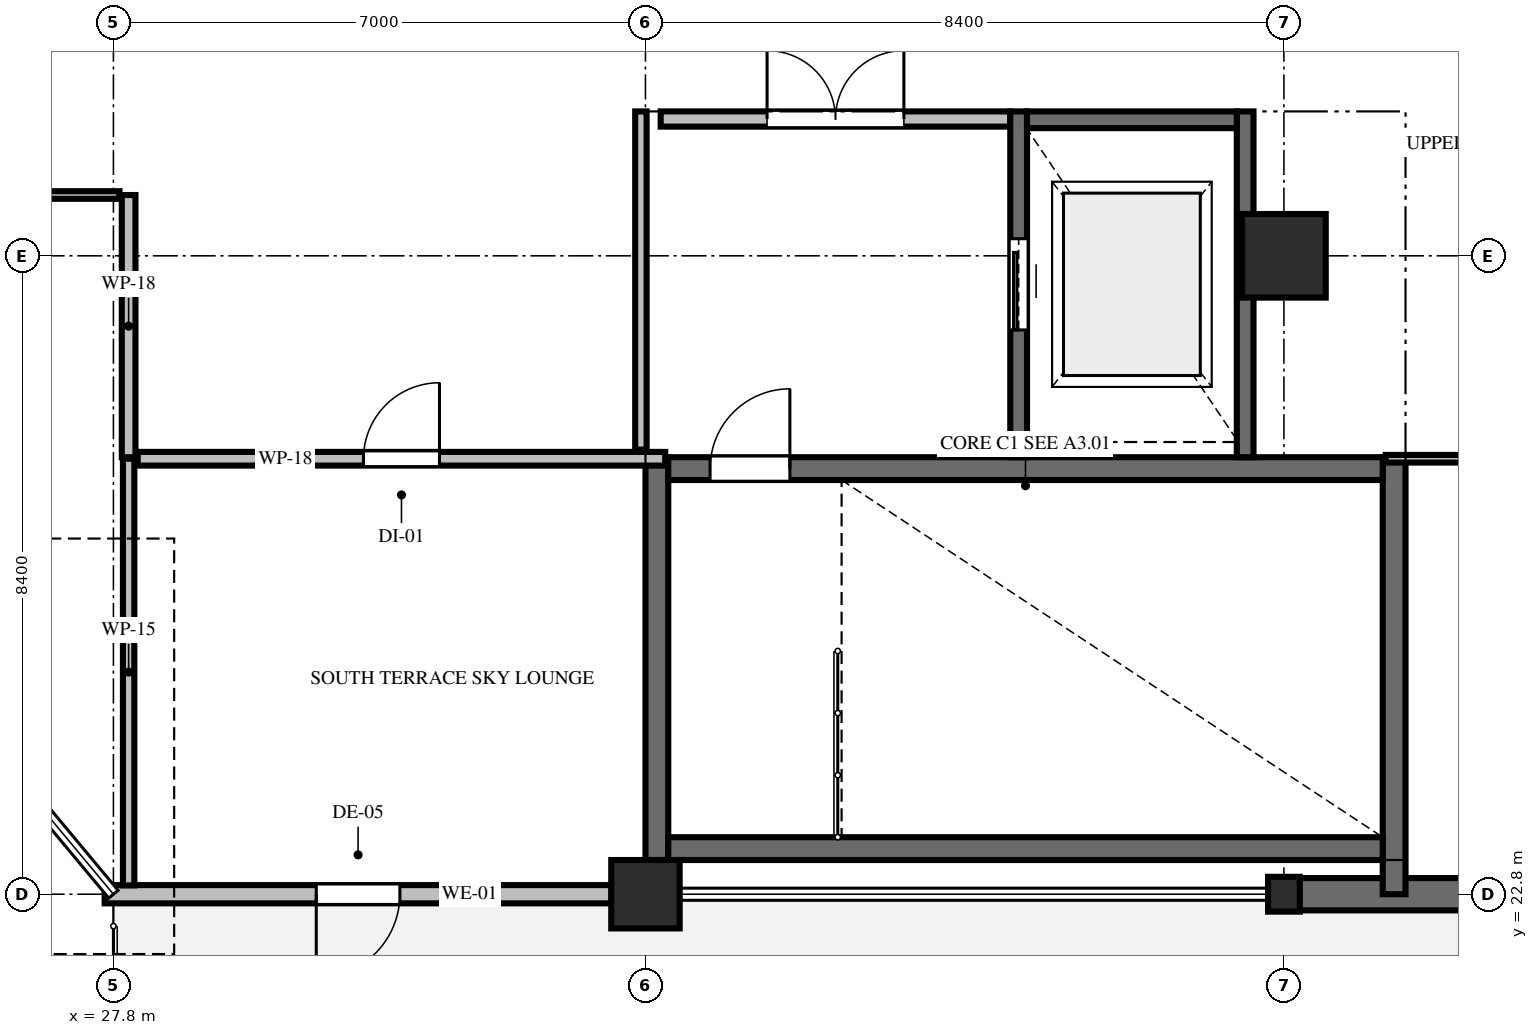
"""IFC4 building model, lengths in metres.
Left out: names, types, materials, properties, quantities, classifications, styles, units other than length and angle.
Written with IfcOpenShell. Run it as: python <this file> out.ifc"""

import sys

from ifc_helpers import new_model, si_unit, direction, frame, frame_2d, origin, origin_2d, place, context, subcontext, project, spatial, rectangle, hollow_rectangle, i_section, extrude, element, fill, save


model = new_model("IFC4")
c1 = context("Model", 3, precision=1e-05, world=origin(), true_north=direction((0.0, 1.0)))
c2 = subcontext(c1, "Body", "Model", "MODEL_VIEW")
j1 = project(units=[si_unit("LENGTHUNIT", "METRE"), si_unit("PLANEANGLEUNIT", "RADIAN")], contexts=[c1])
p1 = place(None, origin())
s1 = spatial("IfcSite", under=j1, at=p1, CompositionType="ELEMENT")
p2 = place(p1, origin())
s2 = spatial("IfcBuilding", under=s1, at=p2, CompositionType="ELEMENT")
p3 = place(p2, frame((0.0, 0.0, 16.8)))
s3 = spatial("IfcBuildingStorey", under=s2, at=p3, CompositionType="ELEMENT", Elevation=16.8)
p4 = place(p3, frame((34.8, 22.8, 0.0), z_axis=(0.0, 0.0, 1.0), x_axis=(1.0, 0.0, 0.0)))
e1 = element("IfcColumn", 1, at=p4, inside=s3, PredefinedType="COLUMN", context=c2, shape_type="SweptSolid", body=[
    extrude(hollow_rectangle(XDim=0.9, YDim=0.9, WallThickness=0.036, InnerFilletRadius=0.036, OuterFilletRadius=0.072, at=origin_2d()), origin(), (0.0, 0.0, 1.0), 5.4),
])
p5 = place(p3, frame((43.2, 22.8, 0.0), z_axis=(0.0, 0.0, 1.0), x_axis=(1.0, 0.0, 0.0)))
e2 = element("IfcColumn", 2, at=p5, inside=s3, PredefinedType="COLUMN", context=c2, shape_type="SweptSolid", body=[
    extrude(i_section(OverallWidth=0.417, OverallDepth=0.458, WebThickness=0.03, FlangeThickness=0.04, FilletRadius=0.022, at=origin_2d()), origin(), (0.0, 0.0, 1.0), 5.4),
])
p6 = place(p3, frame((43.2, 31.2, 0.0), z_axis=(0.0, 0.0, 1.0), x_axis=(1.0, 0.0, 0.0)))
e3 = element("IfcColumn", 3, at=p6, inside=s3, PredefinedType="COLUMN", context=c2, shape_type="SweptSolid", body=[
    extrude(rectangle(XDim=1.1, YDim=1.1, at=origin_2d()), origin(), (0.0, 0.0, 1.0), 5.4),
])
p7 = place(p3, frame((51.204, 22.8, 0.0), z_axis=(0.0, 0.0, 1.0), x_axis=(-1.0, 0.0, 0.0)))
e4 = element("IfcWall", 4, at=p7, inside=s3, PredefinedType="SOLIDWALL", context=c2, shape_type="SweptSolid", body=[
    extrude(rectangle(XDim=7.8, YDim=0.425, at=frame_2d((3.9, 0.0))), origin(), (0.0, 0.0, 1.0), 4.408),
])
p8 = place(p7, frame((2.4, 0.0, 0.9)))
e5 = element("IfcOpeningElement", 5, at=p8, cuts=e4, PredefinedType="OPENING", context=c2, shape_type="SweptSolid", body=[
    extrude(rectangle(XDim=3.0, YDim=1.4, at=frame_2d((1.5, 0.7))), frame((0.0, 0.222, 0.0), z_axis=(0.0, -1.0, 0.0), x_axis=(1.0, 0.0, 0.0)), (0.0, 0.0, 1.0), 0.445),
])
p9 = place(p3, frame((34.354, 22.8, 0.0), z_axis=(0.0, 0.0, 1.0), x_axis=(-1.0, 0.0, 0.0)))
e6 = element("IfcWall", 6, at=p9, inside=s3, PredefinedType="SOLIDWALL", context=c2, shape_type="SweptSolid", body=[
    extrude(rectangle(XDim=6.669, YDim=0.24, at=frame_2d((3.334, 0.0))), origin(), (0.0, 0.0, 1.0), 5.1),
])
p10 = place(p9, frame((2.785, 0.0, 0.0)))
e7 = element("IfcOpeningElement", 7, at=p10, cuts=e6, PredefinedType="OPENING", context=c2, shape_type="SweptSolid", body=[
    extrude(rectangle(XDim=1.1, YDim=2.2, at=frame_2d((0.55, 1.1))), frame((0.0, 0.13, 0.0), z_axis=(0.0, -1.0, 0.0), x_axis=(1.0, 0.0, 0.0)), (0.0, 0.0, 1.0), 0.26),
])
p11 = place(p3, frame((34.95, 23.25, 0.0), z_axis=(0.0, 0.0, 1.0), x_axis=(0.0, 1.0, 0.0)))
e8 = element("IfcWall", 8, at=p11, inside=s3, PredefinedType="SHEAR", context=c2, shape_type="SweptSolid", body=[
    extrude(rectangle(XDim=5.3, YDim=0.3, at=frame_2d((2.65, 0.0))), origin(), (0.0, 0.0, 1.0), 5.12),
])
p12 = place(p3, frame((44.65, 28.55, 0.0), z_axis=(0.0, 0.0, 1.0), x_axis=(0.0, -1.0, 0.0)))
e9 = element("IfcWall", 9, at=p12, inside=s3, PredefinedType="SHEAR", context=c2, shape_type="SweptSolid", body=[
    extrude(rectangle(XDim=5.75, YDim=0.3, at=frame_2d((2.875, 0.0))), origin(), (0.0, 0.0, 1.0), 5.12),
])
p13 = place(p3, frame((44.5, 23.4, 0.0), z_axis=(0.0, 0.0, 1.0), x_axis=(-1.0, 0.0, 0.0)))
e10 = element("IfcWall", 10, at=p13, inside=s3, PredefinedType="SHEAR", context=c2, shape_type="SweptSolid", body=[
    extrude(rectangle(XDim=9.4, YDim=0.3, at=frame_2d((4.7, 0.0))), origin(), (0.0, 0.0, 1.0), 5.12),
])
p14 = place(p3, frame((35.1, 28.4, 0.0), z_axis=(0.0, 0.0, 1.0), x_axis=(1.0, 0.0, 0.0)))
e11 = element("IfcWall", 11, at=p14, inside=s3, PredefinedType="SHEAR", context=c2, shape_type="SweptSolid", body=[
    extrude(rectangle(XDim=9.4, YDim=0.3, at=frame_2d((4.7, 0.0))), origin(), (0.0, 0.0, 1.0), 5.12),
])
p15 = place(p14, frame((0.55, 0.0, 0.0)))
e12 = element("IfcOpeningElement", 12, at=p15, cuts=e11, PredefinedType="OPENING", context=c2, shape_type="SweptSolid", body=[
    extrude(rectangle(XDim=1.05, YDim=2.2, at=frame_2d((0.525, 1.1))), frame((0.0, 0.16, 0.0), z_axis=(0.0, -1.0, 0.0), x_axis=(1.0, 0.0, 0.0)), (0.0, 0.0, 1.0), 0.32),
])
p16 = place(p3, frame((35.0, 33.0, 0.0), z_axis=(0.0, 0.0, 1.0), x_axis=(1.0, 0.0, 0.0)))
e13 = element("IfcWall", 13, at=p16, inside=s3, PredefinedType="SOLIDWALL", context=c2, shape_type="SweptSolid", body=[
    extrude(rectangle(XDim=4.6, YDim=0.2, at=frame_2d((2.3, 0.0))), origin(), (0.0, 0.0, 1.0), 4.41),
])
p17 = place(p16, frame((1.4, 0.0, 0.0)))
e14 = element("IfcOpeningElement", 14, at=p17, cuts=e13, PredefinedType="OPENING", context=c2, shape_type="SweptSolid", body=[
    extrude(rectangle(XDim=1.8, YDim=2.2, at=frame_2d((0.9, 1.1))), frame((0.0, 0.11, 0.0), z_axis=(0.0, -1.0, 0.0), x_axis=(1.0, 0.0, 0.0)), (0.0, 0.0, 1.0), 0.22),
])
p18 = place(p3, frame((39.71, 28.55, 0.0), z_axis=(0.0, 0.0, 1.0), x_axis=(0.0, 1.0, 0.0)))
e15 = element("IfcWall", 15, at=p18, inside=s3, PredefinedType="SOLIDWALL", context=c2, shape_type="SweptSolid", body=[
    extrude(rectangle(XDim=4.55, YDim=0.22, at=frame_2d((2.275, 0.0))), origin(), (0.0, 0.0, 1.0), 5.12),
])
p19 = place(p18, frame((1.675, 0.0, 0.0)))
e16 = element("IfcOpeningElement", 16, at=p19, cuts=e15, PredefinedType="OPENING", context=c2, shape_type="SweptSolid", body=[
    extrude(rectangle(XDim=1.2, YDim=2.2, at=frame_2d((0.6, 1.1))), frame((0.0, 0.12, 0.0), z_axis=(0.0, -1.0, 0.0), x_axis=(1.0, 0.0, 0.0)), (0.0, 0.0, 1.0), 0.24),
])
p20 = place(p3, frame((42.69, 28.55, 0.0), z_axis=(0.0, 0.0, 1.0), x_axis=(0.0, 1.0, 0.0)))
e17 = element("IfcWall", 17, at=p20, inside=s3, PredefinedType="SOLIDWALL", context=c2, shape_type="SweptSolid", body=[
    extrude(rectangle(XDim=4.55, YDim=0.22, at=frame_2d((2.275, 0.0))), origin(), (0.0, 0.0, 1.0), 5.12),
])
p21 = place(p3, frame((39.82, 32.99, 0.0), z_axis=(0.0, 0.0, 1.0), x_axis=(1.0, 0.0, 0.0)))
e18 = element("IfcWall", 18, at=p21, inside=s3, PredefinedType="SOLIDWALL", context=c2, shape_type="SweptSolid", body=[
    extrude(rectangle(XDim=2.76, YDim=0.22, at=frame_2d((1.38, 0.0))), origin(), (0.0, 0.0, 1.0), 5.12),
])
p22 = place(p3, frame((28.0, 22.916, 0.0), z_axis=(0.0, 0.0, 1.0), x_axis=(0.0, 1.0, 0.0)))
e19 = element("IfcWall", 19, at=p22, inside=s3, PredefinedType="PARTITIONING", context=c2, shape_type="SweptSolid", body=[
    extrude(rectangle(XDim=5.614, YDim=0.15, at=frame_2d((2.807, 0.0))), origin(), (0.0, 0.0, 1.0), 5.05),
])
p23 = place(p3, frame((28.12, 28.53, 0.0), z_axis=(0.0, 0.0, 1.0), x_axis=(1.0, 0.0, 0.0)))
e20 = element("IfcWall", 20, at=p23, inside=s3, PredefinedType="PARTITIONING", context=c2, shape_type="SweptSolid", body=[
    extrude(rectangle(XDim=6.94, YDim=0.18, at=frame_2d((3.47, 0.0))), origin(), (0.0, 0.0, 1.0), 5.05),
])
p24 = place(p23, frame((2.97, 0.0, 0.0)))
e21 = element("IfcOpeningElement", 21, at=p24, cuts=e20, PredefinedType="OPENING", context=c2, shape_type="SweptSolid", body=[
    extrude(rectangle(XDim=1.0, YDim=2.15, at=frame_2d((0.5, 1.075))), frame((0.0, 0.1, 0.0), z_axis=(0.0, -1.0, 0.0), x_axis=(1.0, 0.0, 0.0)), (0.0, 0.0, 1.0), 0.2),
])
p25 = place(p3, frame((44.54, 28.53, 0.0), z_axis=(0.0, 0.0, 1.0), x_axis=(1.0, 0.0, 0.0)))
e22 = element("IfcWall", 22, at=p25, inside=s3, PredefinedType="PARTITIONING", context=c2, shape_type="SweptSolid", body=[
    extrude(rectangle(XDim=19.46, YDim=0.1, at=frame_2d((9.73, 0.0))), origin(), (0.0, 0.0, 1.0), 4.11),
])
p26 = place(p25, frame((9.27, 0.0, 0.0)))
e23 = element("IfcOpeningElement", 23, at=p26, cuts=e22, PredefinedType="OPENING", context=c2, shape_type="SweptSolid", body=[
    extrude(rectangle(XDim=0.92, YDim=2.15, at=frame_2d((0.46, 1.075))), frame((0.0, 0.06, 0.0), z_axis=(0.0, -1.0, 0.0), x_axis=(1.0, 0.0, 0.0)), (0.0, 0.0, 1.0), 0.12),
])
p27 = place(p3, frame((34.74, 33.1, 0.0), z_axis=(0.0, 0.0, 1.0), x_axis=(0.0, -1.0, 0.0)))
e24 = element("IfcWall", 24, at=p27, inside=s3, PredefinedType="PARTITIONING", context=c2, shape_type="SweptSolid", body=[
    extrude(rectangle(XDim=4.45, YDim=0.15, at=frame_2d((2.225, 0.0))), origin(), (0.0, 0.0, 1.0), 5.05),
])
p28 = place(p3, frame((28.0, 28.55, 0.0), z_axis=(0.0, 0.0, 1.0), x_axis=(0.0, 1.0, 0.0)))
e25 = element("IfcWall", 25, at=p28, inside=s3, PredefinedType="PARTITIONING", context=c2, shape_type="SweptSolid", body=[
    extrude(rectangle(XDim=3.45, YDim=0.18, at=frame_2d((1.725, 0.0))), origin(), (0.0, 0.0, 1.0), 5.05),
])
p29 = place(p3, frame((27.88, 32.0, 0.0), z_axis=(0.0, 0.0, 1.0), x_axis=(-1.0, 0.0, 0.0)))
e26 = element("IfcWall", 26, at=p29, inside=s3, PredefinedType="PARTITIONING", context=c2, shape_type="SweptSolid", body=[
    extrude(rectangle(XDim=3.88, YDim=0.1, at=frame_2d((1.94, 0.0))), origin(), (0.0, 0.0, 1.0), 5.05),
])
p30 = place(p10, origin())
e27 = element("IfcDoor", 27, at=p30, inside=s3, OperationType="SINGLE_SWING_RIGHT", PredefinedType="DOOR", context=c2, shape_type="SweptSolid", body=[
    extrude(rectangle(XDim=1.1, YDim=2.2, at=frame_2d((0.55, 1.1))), frame((0.0, 0.025, 0.0), z_axis=(0.0, -1.0, 0.0), x_axis=(1.0, 0.0, 0.0)), (0.0, 0.0, 1.0), 0.05),
])
fill(e7, e27)
p31 = place(p15, origin())
e28 = element("IfcDoor", 28, at=p31, inside=s3, OperationType="SINGLE_SWING_RIGHT", PredefinedType="DOOR", context=c2, shape_type="SweptSolid", body=[
    extrude(rectangle(XDim=1.05, YDim=2.2, at=frame_2d((0.525, 1.1))), frame((0.0, 0.025, 0.0), z_axis=(0.0, -1.0, 0.0), x_axis=(1.0, 0.0, 0.0)), (0.0, 0.0, 1.0), 0.05),
])
fill(e12, e28)
p32 = place(p17, origin())
e29 = element("IfcDoor", 29, at=p32, inside=s3, OperationType="DOUBLE_DOOR_SINGLE_SWING", PredefinedType="DOOR", context=c2, shape_type="SweptSolid", body=[
    extrude(rectangle(XDim=1.8, YDim=2.2, at=frame_2d((0.9, 1.1))), frame((0.0, 0.025, 0.0), z_axis=(0.0, -1.0, 0.0), x_axis=(1.0, 0.0, 0.0)), (0.0, 0.0, 1.0), 0.05),
])
fill(e14, e29)
p33 = place(p19, origin())
e30 = element("IfcDoor", 30, at=p33, inside=s3, OperationType="SLIDING_TO_LEFT", PredefinedType="DOOR", context=c2, shape_type="SweptSolid", body=[
    extrude(rectangle(XDim=1.2, YDim=2.2, at=frame_2d((0.6, 1.1))), frame((0.0, 0.025, 0.0), z_axis=(0.0, -1.0, 0.0), x_axis=(1.0, 0.0, 0.0)), (0.0, 0.0, 1.0), 0.05),
])
fill(e16, e30)
p34 = place(p24, origin())
e31 = element("IfcDoor", 31, at=p34, inside=s3, OperationType="SINGLE_SWING_RIGHT", PredefinedType="DOOR", context=c2, shape_type="SweptSolid", body=[
    extrude(rectangle(XDim=1.0, YDim=2.15, at=frame_2d((0.5, 1.075))), frame((0.0, 0.025, 0.0), z_axis=(0.0, -1.0, 0.0), x_axis=(1.0, 0.0, 0.0)), (0.0, 0.0, 1.0), 0.05),
])
fill(e21, e31)
save(model, sys.argv[1])
